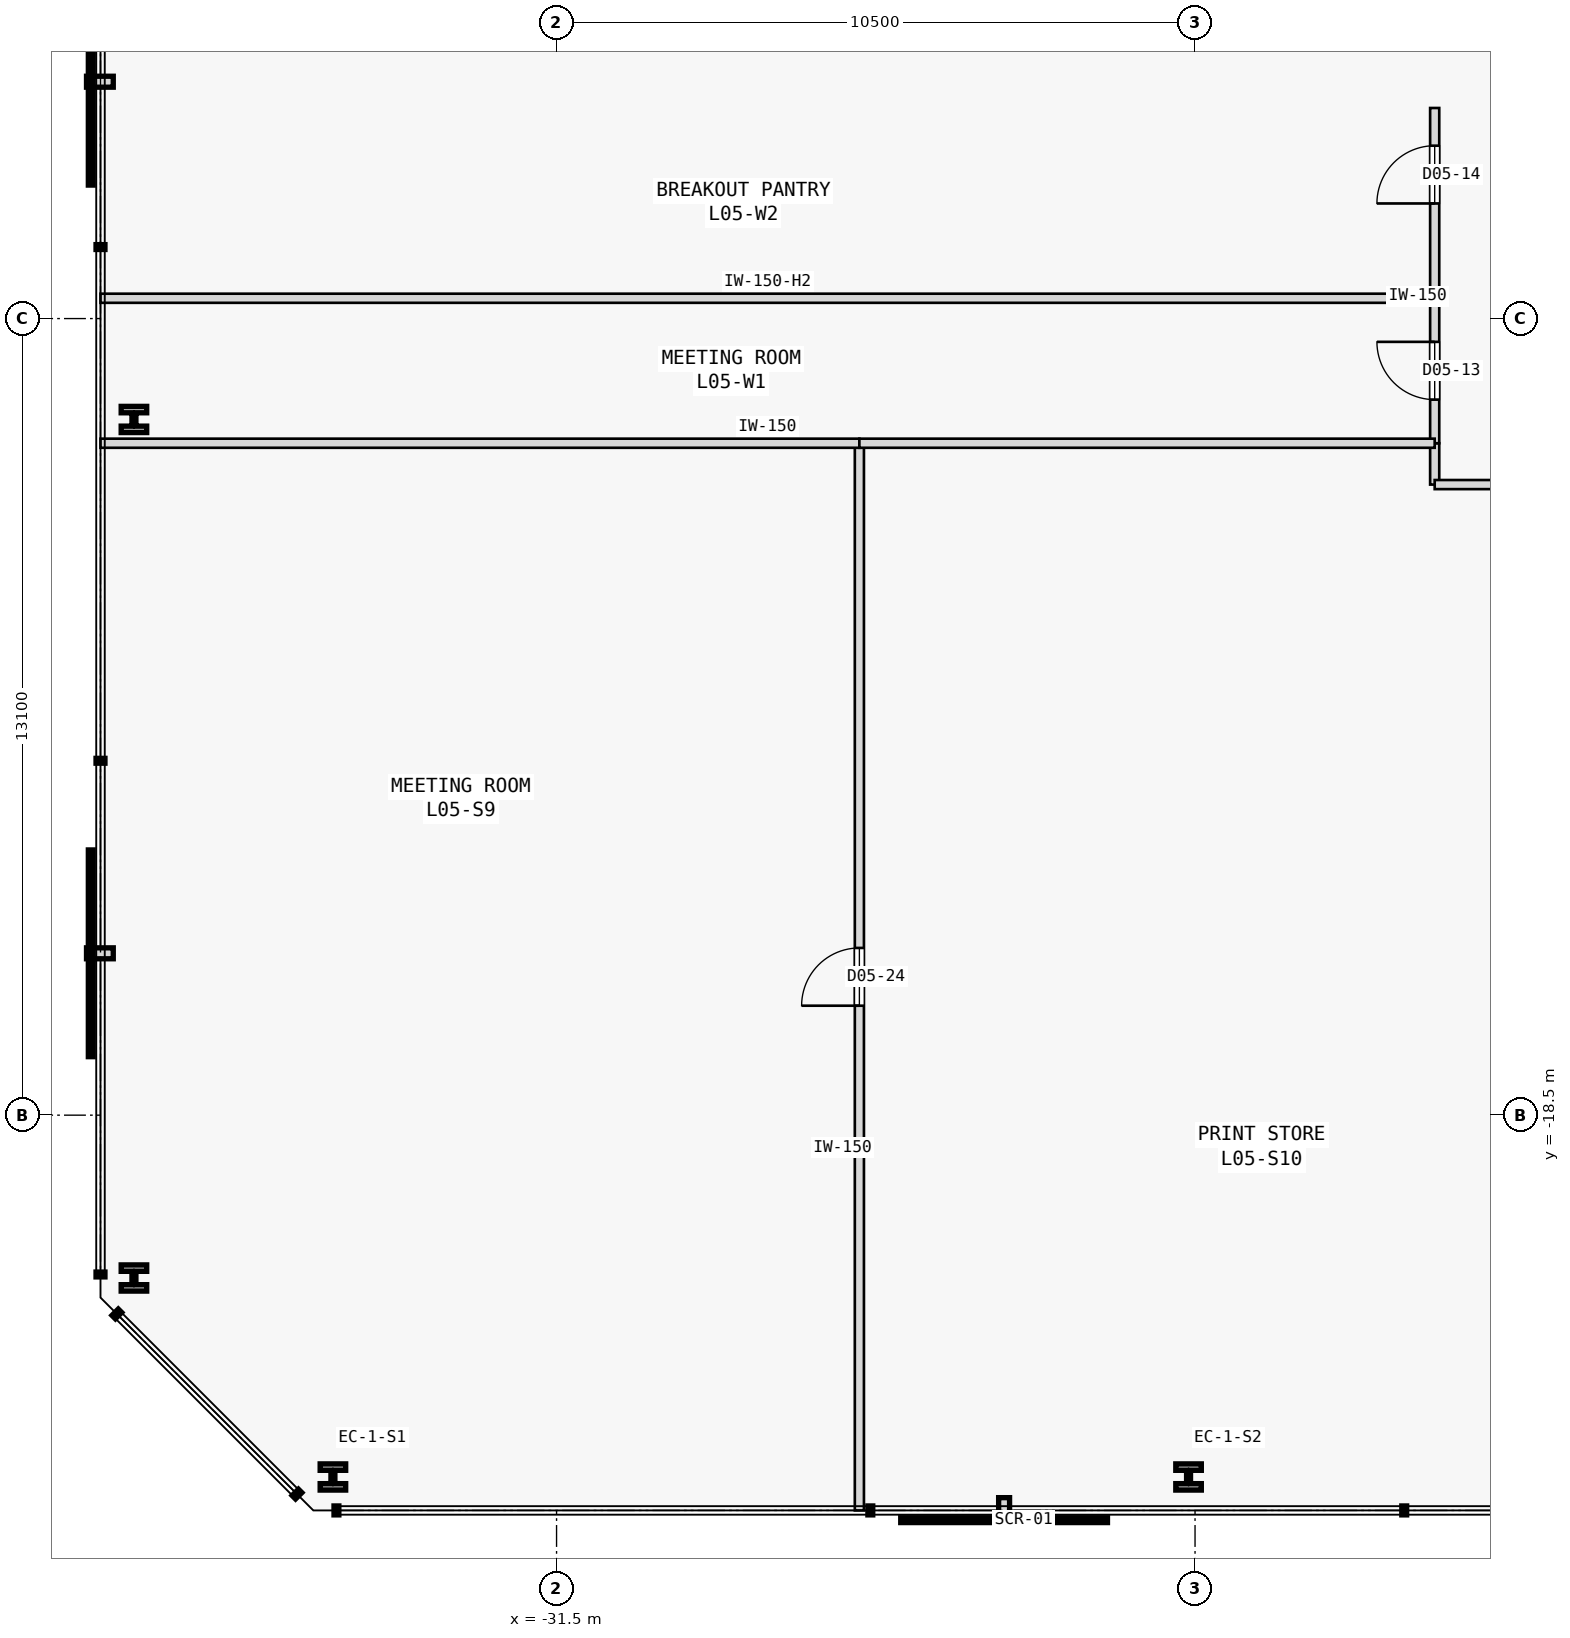
"""IFC4 building model, lengths in metres.
Left out: names, types, materials, properties, quantities, classifications, styles, units other than length and angle.
Written with IfcOpenShell. Run it as: python <this file> out.ifc"""

import sys

from ifc_helpers import new_model, si_unit, direction, frame, frame_2d, origin, origin_2d, place, context, subcontext, project, spatial, rectangle, i_section, extrude, element, fill, save


model = new_model("IFC4")
c1 = context("Model", 3, precision=1e-05, world=origin(), true_north=direction((0.0, 1.0)))
c2 = subcontext(c1, "Body", "Model", "MODEL_VIEW")
j1 = project(units=[si_unit("LENGTHUNIT", "METRE"), si_unit("PLANEANGLEUNIT", "RADIAN")], contexts=[c1])
p1 = place(None, origin())
s1 = spatial("IfcSite", under=j1, at=p1, CompositionType="ELEMENT")
p2 = place(p1, origin())
s2 = spatial("IfcBuilding", under=s1, at=p2, CompositionType="ELEMENT")
p3 = place(p2, frame((0.0, 0.0, 25.6)))
s3 = spatial("IfcBuildingStorey", under=s2, at=p3, CompositionType="ELEMENT", Elevation=25.6)
for number, where, z_axis, x_axis in (
    (1, (-35.178, -24.45, 0.0), (0.0, 0.0, 1.0), (1.0, 0.0, 0.0)),
    (2, (-21.107, -24.45, 0.0), (0.0, 0.0, 1.0), (1.0, 0.0, 0.0)),
    (3, (-38.45, -7.059, 0.0), (0.0, 0.0, 1.0), (1.0, 0.0, 0.0)),
    (4, (-38.45, -21.178, 0.0), (0.0, 0.0, 1.0), (1.0, 0.0, 0.0)),
):
    element("IfcColumn", number, at=place(p3, frame(where, z_axis=z_axis, x_axis=x_axis)), inside=s3, PredefinedType="COLUMN", context=c2, shape_type="SweptSolid", body=[
        extrude(i_section(OverallWidth=0.42, OverallDepth=0.431, WebThickness=0.065, FlangeThickness=0.106, FilletRadius=0.015, at=origin_2d()), origin(), (0.0, 0.0, 1.0), 3.8),
    ])
p4 = place(p3, frame((-17.059, -8.13, 0.0), z_axis=(0.0, 0.0, 1.0), x_axis=(0.0, 1.0, 0.0)))
e5 = element("IfcWall", 5, at=p4, inside=s3, PredefinedType="PARTITIONING", context=c2, shape_type="SweptSolid", body=[
    extrude(rectangle(XDim=0.68, YDim=0.15, at=frame_2d((0.34, 0.0))), origin(), (0.0, 0.0, 1.0), 3.575),
])
p5 = place(p3, frame((-17.059, -8.13, 0.0), z_axis=(0.0, 0.0, 1.0), x_axis=(1.0, 0.0, 0.0)))
e6 = element("IfcWall", 6, at=p5, inside=s3, PredefinedType="PARTITIONING", context=c2, shape_type="SweptSolid", body=[
    extrude(rectangle(XDim=3.019, YDim=0.15, at=frame_2d((1.51, 0.0))), origin(), (0.0, 0.0, 1.0), 3.575),
])
p6 = place(p5, frame((1.034, 0.0, 0.0)))
e7 = element("IfcOpeningElement", 7, at=p6, cuts=e6, PredefinedType="OPENING", context=c2, shape_type="SweptSolid", body=[
    extrude(rectangle(XDim=0.95, YDim=2.15, at=frame_2d((0.475, 1.075))), frame((0.0, 0.085, 0.0), z_axis=(0.0, -1.0, 0.0), x_axis=(1.0, 0.0, 0.0)), (0.0, 0.0, 1.0), 0.17),
])
p7 = place(p3, frame((-17.059, -7.45, 0.0), z_axis=(0.0, 0.0, 1.0), x_axis=(0.0, 1.0, 0.0)))
e8 = element("IfcWall", 8, at=p7, inside=s3, PredefinedType="PARTITIONING", context=c2, shape_type="SweptSolid", body=[
    extrude(rectangle(XDim=2.384, YDim=0.15, at=frame_2d((1.192, 0.0))), origin(), (0.0, 0.0, 1.0), 3.575),
])
p8 = place(p7, frame((0.717, 0.0, 0.0)))
e9 = element("IfcOpeningElement", 9, at=p8, cuts=e8, PredefinedType="OPENING", context=c2, shape_type="SweptSolid", body=[
    extrude(rectangle(XDim=0.95, YDim=2.15, at=frame_2d((0.475, 1.075))), frame((0.0, 0.085, 0.0), z_axis=(0.0, -1.0, 0.0), x_axis=(1.0, 0.0, 0.0)), (0.0, 0.0, 1.0), 0.17),
])
p9 = place(p3, frame((-17.059, -5.066, 0.0), z_axis=(0.0, 0.0, 1.0), x_axis=(0.0, 1.0, 0.0)))
e10 = element("IfcWall", 10, at=p9, inside=s3, PredefinedType="PARTITIONING", context=c2, shape_type="SweptSolid", body=[
    extrude(rectangle(XDim=3.129, YDim=0.15, at=frame_2d((1.564, 0.0))), origin(), (0.0, 0.0, 1.0), 3.575),
])
p10 = place(p9, frame((1.559, 0.0, 0.0)))
e11 = element("IfcOpeningElement", 11, at=p10, cuts=e10, PredefinedType="OPENING", context=c2, shape_type="SweptSolid", body=[
    extrude(rectangle(XDim=0.95, YDim=2.15, at=frame_2d((0.475, 1.075))), frame((0.0, 0.085, 0.0), z_axis=(0.0, -1.0, 0.0), x_axis=(1.0, 0.0, 0.0)), (0.0, 0.0, 1.0), 0.17),
])
p11 = place(p3, frame((-26.52, -25.0, 0.0), z_axis=(0.0, 0.0, 1.0), x_axis=(0.0, 1.0, 0.0)))
e12 = element("IfcWall", 12, at=p11, inside=s3, PredefinedType="PARTITIONING", context=c2, shape_type="SweptSolid", body=[
    extrude(rectangle(XDim=17.55, YDim=0.15, at=frame_2d((8.775, 0.0))), origin(), (0.0, 0.0, 1.0), 3.575),
])
p12 = place(p11, frame((8.3, 0.0, 0.0)))
e13 = element("IfcOpeningElement", 13, at=p12, cuts=e12, PredefinedType="OPENING", context=c2, shape_type="SweptSolid", body=[
    extrude(rectangle(XDim=0.95, YDim=2.15, at=frame_2d((0.475, 1.075))), frame((0.0, 0.085, 0.0), z_axis=(0.0, -1.0, 0.0), x_axis=(1.0, 0.0, 0.0)), (0.0, 0.0, 1.0), 0.17),
])
p13 = place(p3, frame((-39.0, -7.45, 0.0), z_axis=(0.0, 0.0, 1.0), x_axis=(1.0, 0.0, 0.0)))
e14 = element("IfcWall", 14, at=p13, inside=s3, PredefinedType="PARTITIONING", context=c2, shape_type="SweptSolid", body=[
    extrude(rectangle(XDim=12.48, YDim=0.15, at=frame_2d((6.24, 0.0))), origin(), (0.0, 0.0, 1.0), 3.575),
])
p14 = place(p3, frame((-26.52, -7.45, 0.0), z_axis=(0.0, 0.0, 1.0), x_axis=(1.0, 0.0, 0.0)))
e15 = element("IfcWall", 15, at=p14, inside=s3, PredefinedType="PARTITIONING", context=c2, shape_type="SweptSolid", body=[
    extrude(rectangle(XDim=9.461, YDim=0.15, at=frame_2d((4.73, 0.0))), origin(), (0.0, 0.0, 1.0), 3.575),
])
p15 = place(p3, frame((-39.0, -5.066, 0.0), z_axis=(0.0, 0.0, 1.0), x_axis=(1.0, 0.0, 0.0)))
e16 = element("IfcWall", 16, at=p15, inside=s3, PredefinedType="PARTITIONING", context=c2, shape_type="SweptSolid", body=[
    extrude(rectangle(XDim=21.941, YDim=0.15, at=frame_2d((10.97, 0.0))), origin(), (0.0, 0.0, 1.0), 2.975),
])
p16 = place(p8, origin())
e17 = element("IfcDoor", 17, at=p16, inside=s3, OperationType="SINGLE_SWING_RIGHT", PredefinedType="DOOR", context=c2, shape_type="SweptSolid", body=[
    extrude(rectangle(XDim=0.95, YDim=2.15, at=frame_2d((0.475, 1.075))), frame((0.0, 0.025, 0.0), z_axis=(0.0, -1.0, 0.0), x_axis=(1.0, 0.0, 0.0)), (0.0, 0.0, 1.0), 0.05),
])
fill(e9, e17)
p17 = place(p10, origin())
e18 = element("IfcDoor", 18, at=p17, inside=s3, OperationType="SINGLE_SWING_LEFT", PredefinedType="DOOR", context=c2, shape_type="SweptSolid", body=[
    extrude(rectangle(XDim=0.95, YDim=2.15, at=frame_2d((0.475, 1.075))), frame((0.0, 0.025, 0.0), z_axis=(0.0, -1.0, 0.0), x_axis=(1.0, 0.0, 0.0)), (0.0, 0.0, 1.0), 0.05),
])
fill(e11, e18)
p18 = place(p12, origin())
e19 = element("IfcDoor", 19, at=p18, inside=s3, OperationType="SINGLE_SWING_LEFT", PredefinedType="DOOR", context=c2, shape_type="SweptSolid", body=[
    extrude(rectangle(XDim=0.95, YDim=2.15, at=frame_2d((0.475, 1.075))), frame((0.0, 0.025, 0.0), z_axis=(0.0, -1.0, 0.0), x_axis=(1.0, 0.0, 0.0)), (0.0, 0.0, 1.0), 0.05),
])
fill(e13, e19)
save(model, sys.argv[1])
